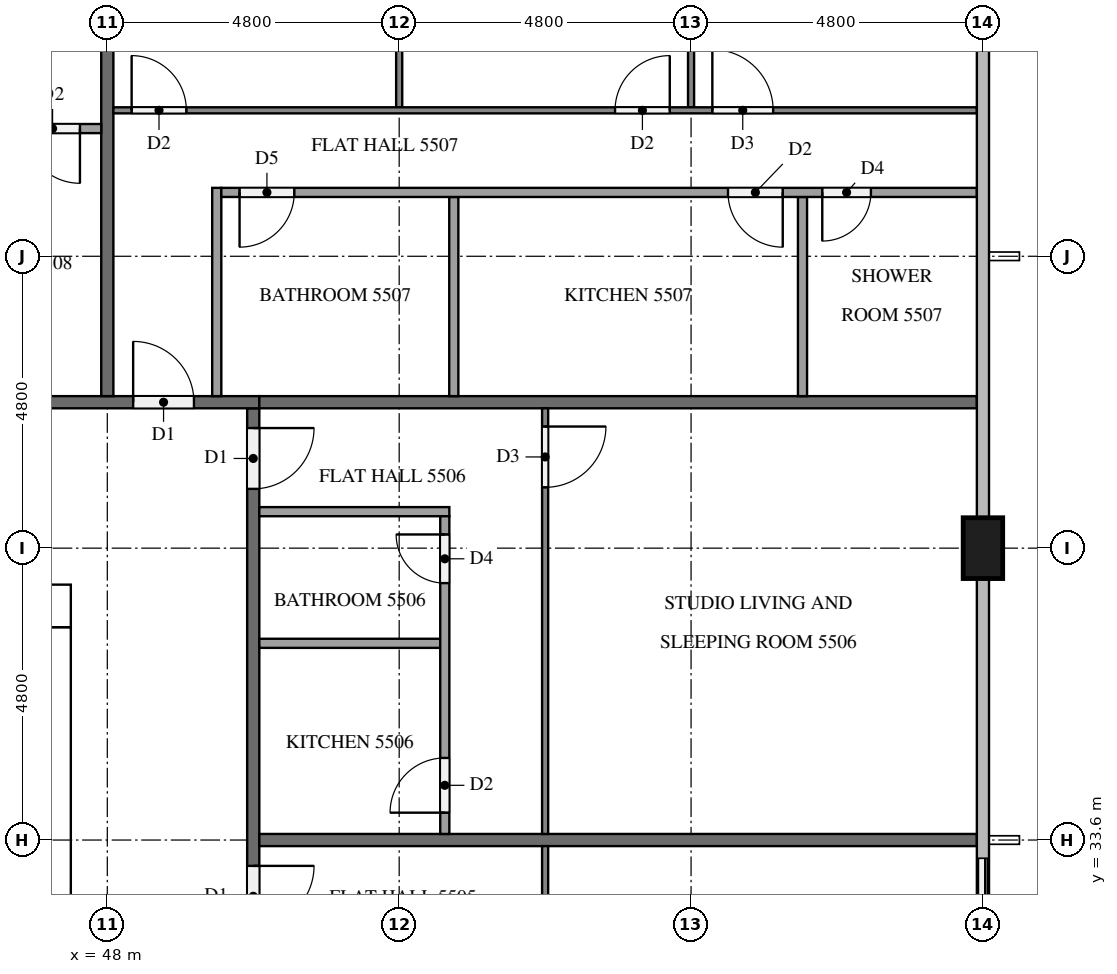
"""IFC4 building model, lengths in metres.
Left out: names, types, materials, properties, quantities, classifications, styles, units other than length and angle.
Written with IfcOpenShell. Run it as: python <this file> out.ifc"""

import sys

from ifc_helpers import new_model, si_unit, direction, frame, frame_2d, origin, origin_2d, place, context, subcontext, project, spatial, rectangle, extrude, element, fill, save


model = new_model("IFC4")
c1 = context("Model", 3, precision=1e-05, world=origin(), true_north=direction((0.0, 1.0)))
c2 = subcontext(c1, "Body", "Model", "MODEL_VIEW")
j1 = project(units=[si_unit("LENGTHUNIT", "METRE"), si_unit("PLANEANGLEUNIT", "RADIAN")], contexts=[c1])
p1 = place(None, origin())
s1 = spatial("IfcSite", under=j1, at=p1, CompositionType="ELEMENT")
p2 = place(p1, origin())
s2 = spatial("IfcBuilding", under=s1, at=p2, CompositionType="ELEMENT")
p3 = place(p2, frame((0.0, 0.0, 212.3)))
s3 = spatial("IfcBuildingStorey", under=s2, at=p3, CompositionType="ELEMENT", Elevation=212.3)
p4 = place(p3, frame((15.0, 37.45, 0.0), z_axis=(0.0, 0.0, 1.0), x_axis=(1.0, 0.0, 0.0)))
e1 = element("IfcWall", 1, at=p4, inside=s3, PredefinedType="SHEAR", context=c2, shape_type="SweptSolid", body=[
    extrude(rectangle(XDim=32.4, YDim=0.7, at=frame_2d((16.2, 0.0))), origin(), (0.0, 0.0, 1.0), 3.2),
])
p5 = place(p4, frame((15.3, 0.0, 0.0)))
e2 = element("IfcOpeningElement", 2, at=p5, cuts=e1, PredefinedType="OPENING", context=c2, shape_type="SweptSolid", body=[
    extrude(rectangle(XDim=1.8, YDim=2.1, at=frame_2d((0.9, 1.05))), frame((0.0, 0.36, 0.0), z_axis=(0.0, -1.0, 0.0), x_axis=(1.0, 0.0, 0.0)), (0.0, 0.0, 1.0), 0.72),
])
p6 = place(p4, frame((1.544, 0.0, 0.0)))
e3 = element("IfcOpeningElement", 3, at=p6, cuts=e1, PredefinedType="OPENING", context=c2, shape_type="SweptSolid", body=[
    extrude(rectangle(XDim=1.0, YDim=2.1, at=frame_2d((0.5, 1.05))), frame((0.0, 0.36, 0.0), z_axis=(0.0, -1.0, 0.0), x_axis=(1.0, 0.0, 0.0)), (0.0, 0.0, 1.0), 0.72),
])
p7 = place(p4, frame((5.219, 0.0, 0.0)))
e4 = element("IfcOpeningElement", 4, at=p7, cuts=e1, PredefinedType="OPENING", context=c2, shape_type="SweptSolid", body=[
    extrude(rectangle(XDim=1.0, YDim=2.1, at=frame_2d((0.5, 1.05))), frame((0.0, 0.36, 0.0), z_axis=(0.0, -1.0, 0.0), x_axis=(1.0, 0.0, 0.0)), (0.0, 0.0, 1.0), 0.72),
])
p8 = place(p3, frame((47.05, 15.7, 0.0), z_axis=(0.0, 0.0, 1.0), x_axis=(0.0, 1.0, 0.0)))
e5 = element("IfcWall", 5, at=p8, inside=s3, PredefinedType="SHEAR", context=c2, shape_type="SweptSolid", body=[
    extrude(rectangle(XDim=21.4, YDim=0.7, at=frame_2d((10.7, 0.0))), origin(), (0.0, 0.0, 1.0), 3.2),
])
p9 = place(p8, frame((10.4, 0.0, 0.0)))
e6 = element("IfcOpeningElement", 6, at=p9, cuts=e5, PredefinedType="OPENING", context=c2, shape_type="SweptSolid", body=[
    extrude(rectangle(XDim=1.2, YDim=2.1, at=frame_2d((0.6, 1.05))), frame((0.0, 0.36, 0.0), z_axis=(0.0, -1.0, 0.0), x_axis=(1.0, 0.0, 0.0)), (0.0, 0.0, 1.0), 0.72),
])
p10 = place(p3, frame((62.4, 38.4, 0.0), z_axis=(0.0, 0.0, 1.0), x_axis=(0.0, 1.0, 0.0)))
e7 = element("IfcColumn", 7, at=p10, inside=s3, PredefinedType="COLUMN", context=c2, shape_type="SweptSolid", body=[
    extrude(rectangle(XDim=1.0, YDim=0.65, at=origin_2d()), origin(), (0.0, 0.0, 1.0), 3.2),
])
p11 = place(p3, frame((62.4, 31.2, 0.0), z_axis=(0.0, 0.0, 1.0), x_axis=(0.0, 1.0, 0.0)))
e8 = element("IfcWall", 8, at=p11, inside=s3, PredefinedType="SOLIDWALL", context=c2, shape_type="SweptSolid", body=[
    extrude(rectangle(XDim=2.4, YDim=0.15, at=frame_2d((1.2, 0.0))), origin(), (0.0, 0.0, 1.0), 3.2),
])
p12 = place(p11, frame((0.3, 0.0, 0.0)))
e9 = element("IfcOpeningElement", 9, at=p12, cuts=e8, PredefinedType="OPENING", context=c2, shape_type="SweptSolid", body=[
    extrude(rectangle(XDim=1.8, YDim=2.4, at=frame_2d((0.9, 1.2))), frame((0.0, 0.085, 0.0), z_axis=(0.0, -1.0, 0.0), x_axis=(1.0, 0.0, 0.0)), (0.0, 0.0, 1.0), 0.17),
])
p13 = place(p3, frame((50.4, 40.7, 0.0), z_axis=(0.0, 0.0, 1.0), x_axis=(0.0, -1.0, 0.0)))
e10 = element("IfcWall", 10, at=p13, inside=s3, PredefinedType="PARTITIONING", context=c2, shape_type="SweptSolid", body=[
    extrude(rectangle(XDim=28.6, YDim=0.2, at=frame_2d((14.3, 0.0))), origin(), (0.0, 0.0, 1.0), 3.2),
])
p14 = place(p13, frame((19.525, 0.0, 0.0)))
e11 = element("IfcOpeningElement", 11, at=p14, cuts=e10, PredefinedType="OPENING", context=c2, shape_type="SweptSolid", body=[
    extrude(rectangle(XDim=1.0, YDim=2.1, at=frame_2d((0.5, 1.05))), frame((0.0, 0.11, 0.0), z_axis=(0.0, -1.0, 0.0), x_axis=(1.0, 0.0, 0.0)), (0.0, 0.0, 1.0), 0.22),
])
p15 = place(p13, frame((7.525, 0.0, 0.0)))
e12 = element("IfcOpeningElement", 12, at=p15, cuts=e10, PredefinedType="OPENING", context=c2, shape_type="SweptSolid", body=[
    extrude(rectangle(XDim=1.0, YDim=2.1, at=frame_2d((0.5, 1.05))), frame((0.0, 0.11, 0.0), z_axis=(0.0, -1.0, 0.0), x_axis=(1.0, 0.0, 0.0)), (0.0, 0.0, 1.0), 0.22),
])
p16 = place(p13, frame((0.325, 0.0, 0.0)))
e13 = element("IfcOpeningElement", 13, at=p16, cuts=e10, PredefinedType="OPENING", context=c2, shape_type="SweptSolid", body=[
    extrude(rectangle(XDim=1.0, YDim=2.1, at=frame_2d((0.5, 1.05))), frame((0.0, 0.11, 0.0), z_axis=(0.0, -1.0, 0.0), x_axis=(1.0, 0.0, 0.0)), (0.0, 0.0, 1.0), 0.22),
])
p17 = place(p3, frame((11.9, 40.8, 0.0), z_axis=(0.0, 0.0, 1.0), x_axis=(1.0, 0.0, 0.0)))
e14 = element("IfcWall", 14, at=p17, inside=s3, PredefinedType="PARTITIONING", context=c2, shape_type="SweptSolid", body=[
    extrude(rectangle(XDim=38.6, YDim=0.2, at=frame_2d((19.3, 0.0))), origin(), (0.0, 0.0, 1.0), 3.2),
])
p18 = place(p17, frame((36.525, 0.0, 0.0)))
e15 = element("IfcOpeningElement", 15, at=p18, cuts=e14, PredefinedType="OPENING", context=c2, shape_type="SweptSolid", body=[
    extrude(rectangle(XDim=1.0, YDim=2.1, at=frame_2d((0.5, 1.05))), frame((0.0, 0.11, 0.0), z_axis=(0.0, -1.0, 0.0), x_axis=(1.0, 0.0, 0.0)), (0.0, 0.0, 1.0), 0.22),
])
p19 = place(p17, frame((29.325, 0.0, 0.0)))
e16 = element("IfcOpeningElement", 16, at=p19, cuts=e14, PredefinedType="OPENING", context=c2, shape_type="SweptSolid", body=[
    extrude(rectangle(XDim=1.0, YDim=2.1, at=frame_2d((0.5, 1.05))), frame((0.0, 0.11, 0.0), z_axis=(0.0, -1.0, 0.0), x_axis=(1.0, 0.0, 0.0)), (0.0, 0.0, 1.0), 0.22),
])
p20 = place(p17, frame((12.525, 0.0, 0.0)))
e17 = element("IfcOpeningElement", 17, at=p20, cuts=e14, PredefinedType="OPENING", context=c2, shape_type="SweptSolid", body=[
    extrude(rectangle(XDim=1.0, YDim=2.1, at=frame_2d((0.5, 1.05))), frame((0.0, 0.11, 0.0), z_axis=(0.0, -1.0, 0.0), x_axis=(1.0, 0.0, 0.0)), (0.0, 0.0, 1.0), 0.22),
])
p21 = place(p17, frame((10.625, 0.0, 0.0)))
e18 = element("IfcOpeningElement", 18, at=p21, cuts=e14, PredefinedType="OPENING", context=c2, shape_type="SweptSolid", body=[
    extrude(rectangle(XDim=1.1, YDim=2.1, at=frame_2d((0.55, 1.05))), frame((0.0, 0.11, 0.0), z_axis=(0.0, -1.0, 0.0), x_axis=(1.0, 0.0, 0.0)), (0.0, 0.0, 1.0), 0.22),
])
for number, where, z_axis, x_axis in (
    (19, (50.5, 33.6, 0.0), (0.0, 0.0, 1.0), (1.0, 0.0, 0.0)),
    (20, (50.5, 40.8, 0.0), (0.0, 0.0, 1.0), (1.0, 0.0, 0.0)),
):
    element("IfcWall", number, at=place(p3, frame(where, z_axis=z_axis, x_axis=x_axis)), inside=s3, PredefinedType="PARTITIONING", context=c2, shape_type="SweptSolid", body=[
        extrude(rectangle(XDim=11.8, YDim=0.2, at=frame_2d((5.9, 0.0))), origin(), (0.0, 0.0, 1.0), 3.2),
    ])
p22 = place(p3, frame((48.0, 52.475, 0.0), z_axis=(0.0, 0.0, 1.0), x_axis=(0.0, -1.0, 0.0)))
e21 = element("IfcWall", 21, at=p22, inside=s3, PredefinedType="PARTITIONING", context=c2, shape_type="SweptSolid", body=[
    extrude(rectangle(XDim=11.575, YDim=0.2, at=frame_2d((5.788, 0.0))), origin(), (0.0, 0.0, 1.0), 3.2),
])
p23 = place(p3, frame((55.2, 33.5, 0.0), z_axis=(0.0, 0.0, 1.0), x_axis=(0.0, -1.0, 0.0)))
e22 = element("IfcWall", 22, at=p23, inside=s3, PredefinedType="PARTITIONING", context=c2, shape_type="SweptSolid", body=[
    extrude(rectangle(XDim=11.8, YDim=0.1, at=frame_2d((5.9, 0.0))), origin(), (0.0, 0.0, 1.0), 3.2),
])
p24 = place(p23, frame((5.75, 0.0, 0.0)))
e23 = element("IfcOpeningElement", 23, at=p24, cuts=e22, PredefinedType="OPENING", context=c2, shape_type="SweptSolid", body=[
    extrude(rectangle(XDim=1.0, YDim=2.1, at=frame_2d((0.5, 1.05))), frame((0.0, 0.06, 0.0), z_axis=(0.0, -1.0, 0.0), x_axis=(1.0, 0.0, 0.0)), (0.0, 0.0, 1.0), 0.12),
])
p25 = place(p23, frame((7.45, 0.0, 0.0)))
e24 = element("IfcOpeningElement", 24, at=p25, cuts=e22, PredefinedType="OPENING", context=c2, shape_type="SweptSolid", body=[
    extrude(rectangle(XDim=0.9, YDim=2.1, at=frame_2d((0.45, 1.05))), frame((0.0, 0.06, 0.0), z_axis=(0.0, -1.0, 0.0), x_axis=(1.0, 0.0, 0.0)), (0.0, 0.0, 1.0), 0.12),
])
p26 = place(p3, frame((55.2, 40.7, 0.0), z_axis=(0.0, 0.0, 1.0), x_axis=(0.0, -1.0, 0.0)))
e25 = element("IfcWall", 25, at=p26, inside=s3, PredefinedType="PARTITIONING", context=c2, shape_type="SweptSolid", body=[
    extrude(rectangle(XDim=7.0, YDim=0.1, at=frame_2d((3.5, 0.0))), origin(), (0.0, 0.0, 1.0), 3.2),
])
p27 = place(p26, frame((0.3, 0.0, 0.0)))
e26 = element("IfcOpeningElement", 26, at=p27, cuts=e25, PredefinedType="OPENING", context=c2, shape_type="SweptSolid", body=[
    extrude(rectangle(XDim=1.0, YDim=2.1, at=frame_2d((0.5, 1.05))), frame((0.0, 0.06, 0.0), z_axis=(0.0, -1.0, 0.0), x_axis=(1.0, 0.0, 0.0)), (0.0, 0.0, 1.0), 0.12),
])
p28 = place(p3, frame((50.5, 36.835, 0.0), z_axis=(0.0, 0.0, 1.0), x_axis=(1.0, 0.0, 0.0)))
e27 = element("IfcWall", 27, at=p28, inside=s3, PredefinedType="PARTITIONING", context=c2, shape_type="SweptSolid", body=[
    extrude(rectangle(XDim=2.975, YDim=0.15, at=frame_2d((1.488, 0.0))), origin(), (0.0, 0.0, 1.0), 3.2),
])
p29 = place(p3, frame((50.5, 39.0, 0.0), z_axis=(0.0, 0.0, 1.0), x_axis=(1.0, 0.0, 0.0)))
e28 = element("IfcWall", 28, at=p29, inside=s3, PredefinedType="PARTITIONING", context=c2, shape_type="SweptSolid", body=[
    extrude(rectangle(XDim=3.125, YDim=0.15, at=frame_2d((1.562, 0.0))), origin(), (0.0, 0.0, 1.0), 3.2),
])
p30 = place(p3, frame((53.55, 33.7, 0.0), z_axis=(0.0, 0.0, 1.0), x_axis=(0.0, 1.0, 0.0)))
e29 = element("IfcWall", 29, at=p30, inside=s3, PredefinedType="PARTITIONING", context=c2, shape_type="SweptSolid", body=[
    extrude(rectangle(XDim=5.225, YDim=0.15, at=frame_2d((2.613, 0.0))), origin(), (0.0, 0.0, 1.0), 3.2),
])
p31 = place(p30, frame((4.125, 0.0, 0.0)))
e30 = element("IfcOpeningElement", 30, at=p31, cuts=e29, PredefinedType="OPENING", context=c2, shape_type="SweptSolid", body=[
    extrude(rectangle(XDim=0.8, YDim=2.1, at=frame_2d((0.4, 1.05))), frame((0.0, 0.085, 0.0), z_axis=(0.0, -1.0, 0.0), x_axis=(1.0, 0.0, 0.0)), (0.0, 0.0, 1.0), 0.17),
])
p32 = place(p30, frame((0.35, 0.0, 0.0)))
e31 = element("IfcOpeningElement", 31, at=p32, cuts=e29, PredefinedType="OPENING", context=c2, shape_type="SweptSolid", body=[
    extrude(rectangle(XDim=0.9, YDim=2.1, at=frame_2d((0.45, 1.05))), frame((0.0, 0.085, 0.0), z_axis=(0.0, -1.0, 0.0), x_axis=(1.0, 0.0, 0.0)), (0.0, 0.0, 1.0), 0.17),
])
p33 = place(p3, frame((52.8, 45.65, 0.0), z_axis=(0.0, 0.0, 1.0), x_axis=(0.0, 1.0, 0.0)))
e32 = element("IfcWall", 32, at=p33, inside=s3, PredefinedType="PARTITIONING", context=c2, shape_type="SweptSolid", body=[
    extrude(rectangle(XDim=7.05, YDim=0.1, at=frame_2d((3.525, 0.0))), origin(), (0.0, 0.0, 1.0), 3.2),
])
p34 = place(p3, frame((57.6, 45.65, 0.0), z_axis=(0.0, 0.0, 1.0), x_axis=(0.0, 1.0, 0.0)))
e33 = element("IfcWall", 33, at=p34, inside=s3, PredefinedType="PARTITIONING", context=c2, shape_type="SweptSolid", body=[
    extrude(rectangle(XDim=6.675, YDim=0.1, at=frame_2d((3.337, 0.0))), origin(), (0.0, 0.0, 1.0), 3.2),
])
p35 = place(p3, frame((48.1, 45.6, 0.0), z_axis=(0.0, 0.0, 1.0), x_axis=(1.0, 0.0, 0.0)))
e34 = element("IfcWall", 34, at=p35, inside=s3, PredefinedType="PARTITIONING", context=c2, shape_type="SweptSolid", body=[
    extrude(rectangle(XDim=14.2, YDim=0.1, at=frame_2d((7.1, 0.0))), origin(), (0.0, 0.0, 1.0), 3.2),
])
p36 = place(p35, frame((0.3, 0.0, 0.0)))
e35 = element("IfcOpeningElement", 35, at=p36, cuts=e34, PredefinedType="OPENING", context=c2, shape_type="SweptSolid", body=[
    extrude(rectangle(XDim=0.9, YDim=2.1, at=frame_2d((0.45, 1.05))), frame((0.0, 0.06, 0.0), z_axis=(0.0, -1.0, 0.0), x_axis=(1.0, 0.0, 0.0)), (0.0, 0.0, 1.0), 0.12),
])
p37 = place(p35, frame((8.25, 0.0, 0.0)))
e36 = element("IfcOpeningElement", 36, at=p37, cuts=e34, PredefinedType="OPENING", context=c2, shape_type="SweptSolid", body=[
    extrude(rectangle(XDim=0.9, YDim=2.1, at=frame_2d((0.45, 1.05))), frame((0.0, 0.06, 0.0), z_axis=(0.0, -1.0, 0.0), x_axis=(1.0, 0.0, 0.0)), (0.0, 0.0, 1.0), 0.12),
])
p38 = place(p35, frame((9.85, 0.0, 0.0)))
e37 = element("IfcOpeningElement", 37, at=p38, cuts=e34, PredefinedType="OPENING", context=c2, shape_type="SweptSolid", body=[
    extrude(rectangle(XDim=1.0, YDim=2.1, at=frame_2d((0.5, 1.05))), frame((0.0, 0.06, 0.0), z_axis=(0.0, -1.0, 0.0), x_axis=(1.0, 0.0, 0.0)), (0.0, 0.0, 1.0), 0.12),
])
for number, where, z_axis, x_axis in (
    (38, (53.698, 40.9, 0.0), (0.0, 0.0, 1.0), (0.0, 1.0, 0.0)),
    (39, (59.433, 40.9, 0.0), (0.0, 0.0, 1.0), (0.0, 1.0, 0.0)),
):
    element("IfcWall", number, at=place(p3, frame(where, z_axis=z_axis, x_axis=x_axis)), inside=s3, PredefinedType="PARTITIONING", context=c2, shape_type="SweptSolid", body=[
        extrude(rectangle(XDim=3.275, YDim=0.15, at=frame_2d((1.638, 0.0))), origin(), (0.0, 0.0, 1.0), 3.2),
    ])
p39 = place(p3, frame((49.8, 40.9, 0.0), z_axis=(0.0, 0.0, 1.0), x_axis=(0.0, 1.0, 0.0)))
e40 = element("IfcWall", 40, at=p39, inside=s3, PredefinedType="PARTITIONING", context=c2, shape_type="SweptSolid", body=[
    extrude(rectangle(XDim=3.425, YDim=0.15, at=frame_2d((1.712, 0.0))), origin(), (0.0, 0.0, 1.0), 3.2),
])
p40 = place(p3, frame((62.3, 44.25, 0.0), z_axis=(0.0, 0.0, 1.0), x_axis=(-1.0, 0.0, 0.0)))
e41 = element("IfcWall", 41, at=p40, inside=s3, PredefinedType="PARTITIONING", context=c2, shape_type="SweptSolid", body=[
    extrude(rectangle(XDim=12.425, YDim=0.15, at=frame_2d((6.212, 0.0))), origin(), (0.0, 0.0, 1.0), 3.2),
])
p41 = place(p40, frame((11.225, 0.0, 0.0)))
e42 = element("IfcOpeningElement", 42, at=p41, cuts=e41, PredefinedType="OPENING", context=c2, shape_type="SweptSolid", body=[
    extrude(rectangle(XDim=0.9, YDim=2.1, at=frame_2d((0.45, 1.05))), frame((0.0, 0.085, 0.0), z_axis=(0.0, -1.0, 0.0), x_axis=(1.0, 0.0, 0.0)), (0.0, 0.0, 1.0), 0.17),
])
p42 = place(p40, frame((3.192, 0.0, 0.0)))
e43 = element("IfcOpeningElement", 43, at=p42, cuts=e41, PredefinedType="OPENING", context=c2, shape_type="SweptSolid", body=[
    extrude(rectangle(XDim=0.9, YDim=2.1, at=frame_2d((0.45, 1.05))), frame((0.0, 0.085, 0.0), z_axis=(0.0, -1.0, 0.0), x_axis=(1.0, 0.0, 0.0)), (0.0, 0.0, 1.0), 0.17),
])
p43 = place(p40, frame((1.742, 0.0, 0.0)))
e44 = element("IfcOpeningElement", 44, at=p43, cuts=e41, PredefinedType="OPENING", context=c2, shape_type="SweptSolid", body=[
    extrude(rectangle(XDim=0.8, YDim=2.1, at=frame_2d((0.4, 1.05))), frame((0.0, 0.085, 0.0), z_axis=(0.0, -1.0, 0.0), x_axis=(1.0, 0.0, 0.0)), (0.0, 0.0, 1.0), 0.17),
])
p44 = place(p3, frame((47.9, 45.3, 0.0), z_axis=(0.0, 0.0, 1.0), x_axis=(-1.0, 0.0, 0.0)))
e45 = element("IfcWall", 45, at=p44, inside=s3, PredefinedType="PARTITIONING", context=c2, shape_type="SweptSolid", body=[
    extrude(rectangle(XDim=5.225, YDim=0.15, at=frame_2d((2.612, 0.0))), origin(), (0.0, 0.0, 1.0), 3.2),
])
p45 = place(p44, frame((4.125, 0.0, 0.0)))
e46 = element("IfcOpeningElement", 46, at=p45, cuts=e45, PredefinedType="OPENING", context=c2, shape_type="SweptSolid", body=[
    extrude(rectangle(XDim=0.8, YDim=2.1, at=frame_2d((0.4, 1.05))), frame((0.0, 0.085, 0.0), z_axis=(0.0, -1.0, 0.0), x_axis=(1.0, 0.0, 0.0)), (0.0, 0.0, 1.0), 0.17),
])
p46 = place(p44, frame((0.35, 0.0, 0.0)))
e47 = element("IfcOpeningElement", 47, at=p46, cuts=e45, PredefinedType="OPENING", context=c2, shape_type="SweptSolid", body=[
    extrude(rectangle(XDim=0.9, YDim=2.1, at=frame_2d((0.45, 1.05))), frame((0.0, 0.085, 0.0), z_axis=(0.0, -1.0, 0.0), x_axis=(1.0, 0.0, 0.0)), (0.0, 0.0, 1.0), 0.17),
])
p47 = place(p12, origin())
e48 = element("IfcDoor", 48, at=p47, inside=s3, OperationType="SLIDING_TO_RIGHT", PredefinedType="DOOR", context=c2, shape_type="SweptSolid", body=[
    extrude(rectangle(XDim=1.8, YDim=2.4, at=frame_2d((0.9, 1.2))), frame((0.0, 0.025, 0.0), z_axis=(0.0, -1.0, 0.0), x_axis=(1.0, 0.0, 0.0)), (0.0, 0.0, 1.0), 0.05),
])
fill(e9, e48)
p48 = place(p15, origin())
e49 = element("IfcDoor", 49, at=p48, inside=s3, OperationType="SINGLE_SWING_LEFT", PredefinedType="DOOR", context=c2, shape_type="SweptSolid", body=[
    extrude(rectangle(XDim=1.0, YDim=2.1, at=frame_2d((0.5, 1.05))), frame((0.0, 0.025, 0.0), z_axis=(0.0, -1.0, 0.0), x_axis=(1.0, 0.0, 0.0)), (0.0, 0.0, 1.0), 0.05),
])
fill(e12, e49)
p49 = place(p16, origin())
e50 = element("IfcDoor", 50, at=p49, inside=s3, OperationType="SINGLE_SWING_LEFT", PredefinedType="DOOR", context=c2, shape_type="SweptSolid", body=[
    extrude(rectangle(XDim=1.0, YDim=2.1, at=frame_2d((0.5, 1.05))), frame((0.0, 0.025, 0.0), z_axis=(0.0, -1.0, 0.0), x_axis=(1.0, 0.0, 0.0)), (0.0, 0.0, 1.0), 0.05),
])
fill(e13, e50)
p50 = place(p18, origin())
e51 = element("IfcDoor", 51, at=p50, inside=s3, OperationType="SINGLE_SWING_LEFT", PredefinedType="DOOR", context=c2, shape_type="SweptSolid", body=[
    extrude(rectangle(XDim=1.0, YDim=2.1, at=frame_2d((0.5, 1.05))), frame((0.0, 0.025, 0.0), z_axis=(0.0, -1.0, 0.0), x_axis=(1.0, 0.0, 0.0)), (0.0, 0.0, 1.0), 0.05),
])
fill(e15, e51)
p51 = place(p27, origin())
e52 = element("IfcDoor", 52, at=p51, inside=s3, OperationType="SINGLE_SWING_LEFT", PredefinedType="DOOR", context=c2, shape_type="SweptSolid", body=[
    extrude(rectangle(XDim=1.0, YDim=2.1, at=frame_2d((0.5, 1.05))), frame((0.0, 0.025, 0.0), z_axis=(0.0, -1.0, 0.0), x_axis=(1.0, 0.0, 0.0)), (0.0, 0.0, 1.0), 0.05),
])
fill(e26, e52)
p52 = place(p31, origin())
e53 = element("IfcDoor", 53, at=p52, inside=s3, OperationType="SINGLE_SWING_RIGHT", PredefinedType="DOOR", context=c2, shape_type="SweptSolid", body=[
    extrude(rectangle(XDim=0.8, YDim=2.1, at=frame_2d((0.4, 1.05))), frame((0.0, 0.025, 0.0), z_axis=(0.0, -1.0, 0.0), x_axis=(1.0, 0.0, 0.0)), (0.0, 0.0, 1.0), 0.05),
])
fill(e30, e53)
p53 = place(p32, origin())
e54 = element("IfcDoor", 54, at=p53, inside=s3, OperationType="SINGLE_SWING_LEFT", PredefinedType="DOOR", context=c2, shape_type="SweptSolid", body=[
    extrude(rectangle(XDim=0.9, YDim=2.1, at=frame_2d((0.45, 1.05))), frame((0.0, 0.025, 0.0), z_axis=(0.0, -1.0, 0.0), x_axis=(1.0, 0.0, 0.0)), (0.0, 0.0, 1.0), 0.05),
])
fill(e31, e54)
p54 = place(p36, origin())
e55 = element("IfcDoor", 55, at=p54, inside=s3, OperationType="SINGLE_SWING_LEFT", PredefinedType="DOOR", context=c2, shape_type="SweptSolid", body=[
    extrude(rectangle(XDim=0.9, YDim=2.1, at=frame_2d((0.45, 1.05))), frame((0.0, 0.025, 0.0), z_axis=(0.0, -1.0, 0.0), x_axis=(1.0, 0.0, 0.0)), (0.0, 0.0, 1.0), 0.05),
])
fill(e35, e55)
p55 = place(p37, origin())
e56 = element("IfcDoor", 56, at=p55, inside=s3, OperationType="SINGLE_SWING_RIGHT", PredefinedType="DOOR", context=c2, shape_type="SweptSolid", body=[
    extrude(rectangle(XDim=0.9, YDim=2.1, at=frame_2d((0.45, 1.05))), frame((0.0, 0.025, 0.0), z_axis=(0.0, -1.0, 0.0), x_axis=(1.0, 0.0, 0.0)), (0.0, 0.0, 1.0), 0.05),
])
fill(e36, e56)
p56 = place(p38, origin())
e57 = element("IfcDoor", 57, at=p56, inside=s3, OperationType="SINGLE_SWING_LEFT", PredefinedType="DOOR", context=c2, shape_type="SweptSolid", body=[
    extrude(rectangle(XDim=1.0, YDim=2.1, at=frame_2d((0.5, 1.05))), frame((0.0, 0.025, 0.0), z_axis=(0.0, -1.0, 0.0), x_axis=(1.0, 0.0, 0.0)), (0.0, 0.0, 1.0), 0.05),
])
fill(e37, e57)
p57 = place(p41, origin())
e58 = element("IfcDoor", 58, at=p57, inside=s3, OperationType="SINGLE_SWING_RIGHT", PredefinedType="DOOR", context=c2, shape_type="SweptSolid", body=[
    extrude(rectangle(XDim=0.9, YDim=2.1, at=frame_2d((0.45, 1.05))), frame((0.0, 0.025, 0.0), z_axis=(0.0, -1.0, 0.0), x_axis=(1.0, 0.0, 0.0)), (0.0, 0.0, 1.0), 0.05),
])
fill(e42, e58)
p58 = place(p42, origin())
e59 = element("IfcDoor", 59, at=p58, inside=s3, OperationType="SINGLE_SWING_LEFT", PredefinedType="DOOR", context=c2, shape_type="SweptSolid", body=[
    extrude(rectangle(XDim=0.9, YDim=2.1, at=frame_2d((0.45, 1.05))), frame((0.0, 0.025, 0.0), z_axis=(0.0, -1.0, 0.0), x_axis=(1.0, 0.0, 0.0)), (0.0, 0.0, 1.0), 0.05),
])
fill(e43, e59)
p59 = place(p43, origin())
e60 = element("IfcDoor", 60, at=p59, inside=s3, OperationType="SINGLE_SWING_RIGHT", PredefinedType="DOOR", context=c2, shape_type="SweptSolid", body=[
    extrude(rectangle(XDim=0.8, YDim=2.1, at=frame_2d((0.4, 1.05))), frame((0.0, 0.025, 0.0), z_axis=(0.0, -1.0, 0.0), x_axis=(1.0, 0.0, 0.0)), (0.0, 0.0, 1.0), 0.05),
])
fill(e44, e60)
p60 = place(p46, origin())
e61 = element("IfcDoor", 61, at=p60, inside=s3, OperationType="SINGLE_SWING_LEFT", PredefinedType="DOOR", context=c2, shape_type="SweptSolid", body=[
    extrude(rectangle(XDim=0.9, YDim=2.1, at=frame_2d((0.45, 1.05))), frame((0.0, 0.025, 0.0), z_axis=(0.0, -1.0, 0.0), x_axis=(1.0, 0.0, 0.0)), (0.0, 0.0, 1.0), 0.05),
])
fill(e47, e61)
save(model, sys.argv[1])
